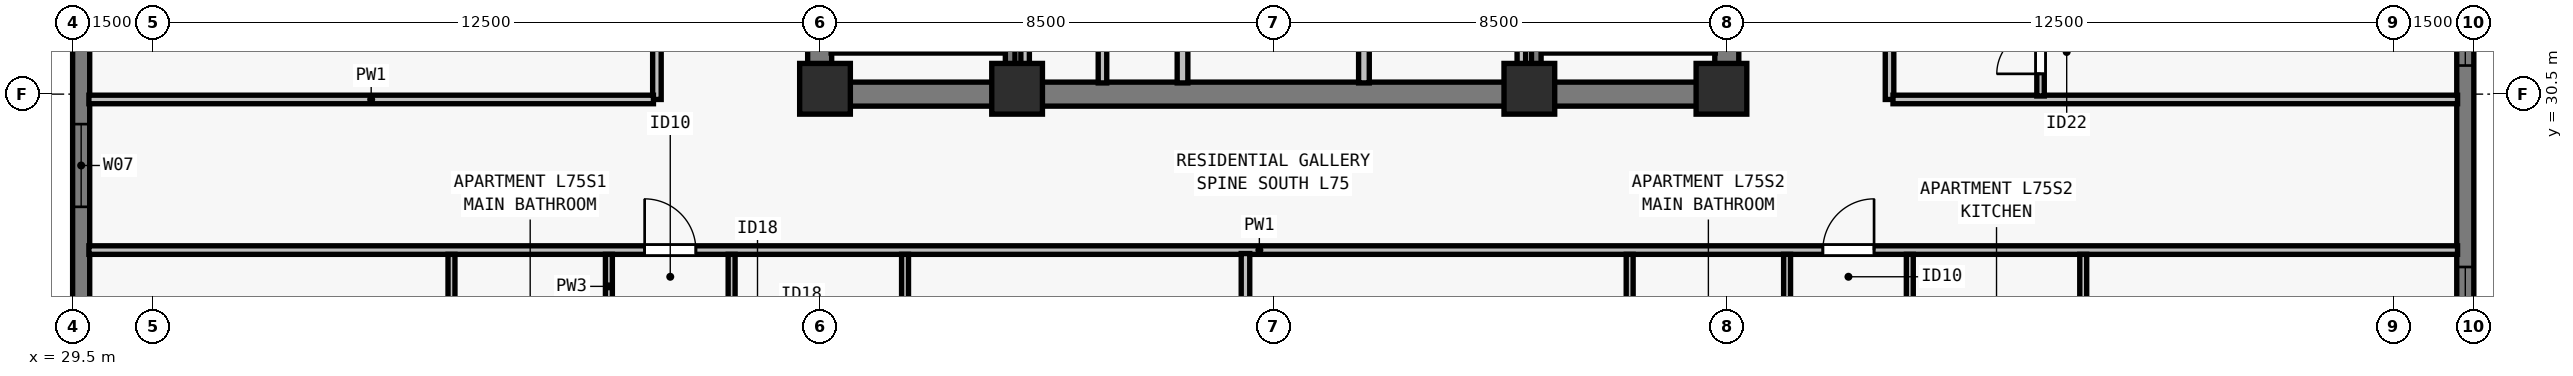
"""IFC4 building model, lengths in metres.
Left out: names, types, materials, properties, quantities, classifications, styles, units other than length and angle.
Written with IfcOpenShell. Run it as: python <this file> out.ifc"""

import sys

from ifc_helpers import new_model, si_unit, direction, frame, frame_2d, origin, origin_2d, place, context, subcontext, project, spatial, rectangle, extrude, element, fill, save


model = new_model("IFC4")
c1 = context("Model", 3, precision=1e-05, world=origin(), true_north=direction((0.0, 1.0)))
c2 = subcontext(c1, "Body", "Model", "MODEL_VIEW")
j1 = project(units=[si_unit("LENGTHUNIT", "METRE"), si_unit("PLANEANGLEUNIT", "RADIAN")], contexts=[c1])
p1 = place(None, origin())
s1 = spatial("IfcSite", under=j1, at=p1, CompositionType="ELEMENT")
p2 = place(p1, origin())
s2 = spatial("IfcBuilding", under=s1, at=p2, CompositionType="ELEMENT")
p3 = place(p2, frame((0.0, 0.0, 272.5)))
s3 = spatial("IfcBuildingStorey", under=s2, at=p3, CompositionType="ELEMENT", Elevation=272.5)
for number, where, z_axis, x_axis in (
    (1, (43.6, 30.6, 0.0), (0.0, 0.0, 1.0), (1.0, 0.0, 0.0)),
    (2, (47.2, 30.6, 0.0), (0.0, 0.0, 1.0), (1.0, 0.0, 0.0)),
    (3, (56.8, 30.6, 0.0), (0.0, 0.0, 1.0), (1.0, 0.0, 0.0)),
    (4, (60.4, 30.6, 0.0), (0.0, 0.0, 1.0), (1.0, 0.0, 0.0)),
):
    element("IfcColumn", number, at=place(p3, frame(where, z_axis=z_axis, x_axis=x_axis)), inside=s3, PredefinedType="COLUMN", context=c2, shape_type="SweptSolid", body=[
        extrude(rectangle(XDim=0.95, YDim=0.95, at=origin_2d()), origin(), (0.0, 0.0, 1.0), 3.5),
    ])
p4 = place(p3, frame((29.66, 21.5, 0.0), z_axis=(0.0, 0.0, 1.0), x_axis=(0.0, 1.0, 0.0)))
e5 = element("IfcWall", 5, at=p4, inside=s3, PredefinedType="SOLIDWALL", context=c2, shape_type="SweptSolid", body=[
    extrude(rectangle(XDim=34.702, YDim=0.32, at=frame_2d((17.351, 0.0))), origin(), (0.0, 0.0, 1.0), 3.24),
])
p5 = place(p4, frame((6.888, 0.0, 0.8)))
e6 = element("IfcOpeningElement", 6, at=p5, cuts=e5, PredefinedType="OPENING", context=c2, shape_type="SweptSolid", body=[
    extrude(rectangle(XDim=1.55, YDim=1.628, at=frame_2d((0.775, 0.814))), frame((0.0, 0.17, 0.0), z_axis=(0.0, -1.0, 0.0), x_axis=(1.0, 0.0, 0.0)), (0.0, 0.0, 1.0), 0.34),
])
p6 = place(p4, frame((10.113, 0.0, 0.8)))
e7 = element("IfcOpeningElement", 7, at=p6, cuts=e5, PredefinedType="OPENING", context=c2, shape_type="SweptSolid", body=[
    extrude(rectangle(XDim=1.85, YDim=1.628, at=frame_2d((0.925, 0.814))), frame((0.0, 0.17, 0.0), z_axis=(0.0, -1.0, 0.0), x_axis=(1.0, 0.0, 0.0)), (0.0, 0.0, 1.0), 0.34),
])
p7 = place(p4, frame((14.888, 0.0, 0.8)))
e8 = element("IfcOpeningElement", 8, at=p7, cuts=e5, PredefinedType="OPENING", context=c2, shape_type="SweptSolid", body=[
    extrude(rectangle(XDim=1.55, YDim=1.628, at=frame_2d((0.775, 0.814))), frame((0.0, 0.17, 0.0), z_axis=(0.0, -1.0, 0.0), x_axis=(1.0, 0.0, 0.0)), (0.0, 0.0, 1.0), 0.34),
])
p8 = place(p4, frame((18.114, 0.0, 0.8)))
e9 = element("IfcOpeningElement", 9, at=p8, cuts=e5, PredefinedType="OPENING", context=c2, shape_type="SweptSolid", body=[
    extrude(rectangle(XDim=1.85, YDim=1.628, at=frame_2d((0.925, 0.814))), frame((0.0, 0.17, 0.0), z_axis=(0.0, -1.0, 0.0), x_axis=(1.0, 0.0, 0.0)), (0.0, 0.0, 1.0), 0.34),
])
p9 = place(p4, frame((23.614, 0.0, 0.8)))
e10 = element("IfcOpeningElement", 10, at=p9, cuts=e5, PredefinedType="OPENING", context=c2, shape_type="SweptSolid", body=[
    extrude(rectangle(XDim=1.85, YDim=1.628, at=frame_2d((0.925, 0.814))), frame((0.0, 0.17, 0.0), z_axis=(0.0, -1.0, 0.0), x_axis=(1.0, 0.0, 0.0)), (0.0, 0.0, 1.0), 0.34),
])
p10 = place(p4, frame((29.24, 0.0, 0.8)))
e11 = element("IfcOpeningElement", 11, at=p10, cuts=e5, PredefinedType="OPENING", context=c2, shape_type="SweptSolid", body=[
    extrude(rectangle(XDim=1.55, YDim=1.628, at=frame_2d((0.775, 0.814))), frame((0.0, 0.17, 0.0), z_axis=(0.0, -1.0, 0.0), x_axis=(1.0, 0.0, 0.0)), (0.0, 0.0, 1.0), 0.34),
])
p11 = place(p3, frame((74.34, 56.5, 0.0), z_axis=(0.0, 0.0, 1.0), x_axis=(0.0, -1.0, 0.0)))
e12 = element("IfcWall", 12, at=p11, inside=s3, PredefinedType="SOLIDWALL", context=c2, shape_type="SweptSolid", body=[
    extrude(rectangle(XDim=34.702, YDim=0.32, at=frame_2d((17.351, 0.0))), origin(), (0.0, 0.0, 1.0), 3.24),
])
p12 = place(p11, frame((6.888, 0.0, 0.8)))
e13 = element("IfcOpeningElement", 13, at=p12, cuts=e12, PredefinedType="OPENING", context=c2, shape_type="SweptSolid", body=[
    extrude(rectangle(XDim=1.55, YDim=1.628, at=frame_2d((0.775, 0.814))), frame((0.0, 0.17, 0.0), z_axis=(0.0, -1.0, 0.0), x_axis=(1.0, 0.0, 0.0)), (0.0, 0.0, 1.0), 0.34),
])
p13 = place(p11, frame((10.113, 0.0, 0.8)))
e14 = element("IfcOpeningElement", 14, at=p13, cuts=e12, PredefinedType="OPENING", context=c2, shape_type="SweptSolid", body=[
    extrude(rectangle(XDim=1.85, YDim=1.628, at=frame_2d((0.925, 0.814))), frame((0.0, 0.17, 0.0), z_axis=(0.0, -1.0, 0.0), x_axis=(1.0, 0.0, 0.0)), (0.0, 0.0, 1.0), 0.34),
])
p14 = place(p11, frame((14.038, 0.0, 0.8)))
e15 = element("IfcOpeningElement", 15, at=p14, cuts=e12, PredefinedType="OPENING", context=c2, shape_type="SweptSolid", body=[
    extrude(rectangle(XDim=1.55, YDim=1.628, at=frame_2d((0.775, 0.814))), frame((0.0, 0.17, 0.0), z_axis=(0.0, -1.0, 0.0), x_axis=(1.0, 0.0, 0.0)), (0.0, 0.0, 1.0), 0.34),
])
p15 = place(p11, frame((18.114, 0.0, 0.8)))
e16 = element("IfcOpeningElement", 16, at=p15, cuts=e12, PredefinedType="OPENING", context=c2, shape_type="SweptSolid", body=[
    extrude(rectangle(XDim=1.85, YDim=1.628, at=frame_2d((0.925, 0.814))), frame((0.0, 0.17, 0.0), z_axis=(0.0, -1.0, 0.0), x_axis=(1.0, 0.0, 0.0)), (0.0, 0.0, 1.0), 0.34),
])
p16 = place(p11, frame((23.614, 0.0, 0.8)))
e17 = element("IfcOpeningElement", 17, at=p16, cuts=e12, PredefinedType="OPENING", context=c2, shape_type="SweptSolid", body=[
    extrude(rectangle(XDim=1.85, YDim=1.628, at=frame_2d((0.925, 0.814))), frame((0.0, 0.17, 0.0), z_axis=(0.0, -1.0, 0.0), x_axis=(1.0, 0.0, 0.0)), (0.0, 0.0, 1.0), 0.34),
])
p17 = place(p11, frame((29.24, 0.0, 0.8)))
e18 = element("IfcOpeningElement", 18, at=p17, cuts=e12, PredefinedType="OPENING", context=c2, shape_type="SweptSolid", body=[
    extrude(rectangle(XDim=1.55, YDim=1.628, at=frame_2d((0.775, 0.814))), frame((0.0, 0.17, 0.0), z_axis=(0.0, -1.0, 0.0), x_axis=(1.0, 0.0, 0.0)), (0.0, 0.0, 1.0), 0.34),
])
p18 = place(p3, frame((43.275, 30.5, 0.0), z_axis=(0.0, 0.0, 1.0), x_axis=(1.0, 0.0, 0.0)))
e19 = element("IfcWall", 19, at=p18, inside=s3, PredefinedType="SHEAR", context=c2, shape_type="SweptSolid", body=[
    extrude(rectangle(XDim=17.45, YDim=0.45, at=frame_2d((8.725, 0.0))), origin(), (0.0, 0.0, 1.0), 3.24),
])
for number, where, z_axis, x_axis in (
    (20, (43.5, 30.715, 0.0), (0.0, 0.0, 1.0), (0.0, 1.0, 0.0)),
    (21, (60.5, 30.715, 0.0), (0.0, 0.0, 1.0), (0.0, 1.0, 0.0)),
):
    element("IfcWall", number, at=place(p3, frame(where, z_axis=z_axis, x_axis=x_axis)), inside=s3, PredefinedType="SHEAR", context=c2, shape_type="SweptSolid", body=[
        extrude(rectangle(XDim=8.035, YDim=0.45, at=frame_2d((4.018, 0.0))), origin(), (0.0, 0.0, 1.0), 3.24),
    ])
p19 = place(p3, frame((50.3, 30.71, 0.0), z_axis=(0.0, 0.0, 1.0), x_axis=(0.0, 1.0, 0.0)))
e22 = element("IfcWall", 22, at=p19, inside=s3, PredefinedType="SOLIDWALL", context=c2, shape_type="SweptSolid", body=[
    extrude(rectangle(XDim=7.905, YDim=0.2, at=frame_2d((3.953, 0.0))), origin(), (0.0, 0.0, 1.0), 3.24),
])
p20 = place(p19, frame((2.14, 0.0, 0.0)))
e23 = element("IfcOpeningElement", 23, at=p20, cuts=e22, PredefinedType="OPENING", context=c2, shape_type="SweptSolid", body=[
    extrude(rectangle(XDim=0.95, YDim=2.12, at=frame_2d((0.475, 1.06))), frame((0.0, 0.11, 0.0), z_axis=(0.0, -1.0, 0.0), x_axis=(1.0, 0.0, 0.0)), (0.0, 0.0, 1.0), 0.22),
])
p21 = place(p3, frame((53.7, 30.71, 0.0), z_axis=(0.0, 0.0, 1.0), x_axis=(0.0, 1.0, 0.0)))
e24 = element("IfcWall", 24, at=p21, inside=s3, PredefinedType="SOLIDWALL", context=c2, shape_type="SweptSolid", body=[
    extrude(rectangle(XDim=7.905, YDim=0.2, at=frame_2d((3.953, 0.0))), origin(), (0.0, 0.0, 1.0), 3.24),
])
p22 = place(p21, frame((1.39, 0.0, 0.0)))
e25 = element("IfcOpeningElement", 25, at=p22, cuts=e24, PredefinedType="OPENING", context=c2, shape_type="SweptSolid", body=[
    extrude(rectangle(XDim=0.95, YDim=2.12, at=frame_2d((0.475, 1.06))), frame((0.0, 0.11, 0.0), z_axis=(0.0, -1.0, 0.0), x_axis=(1.0, 0.0, 0.0)), (0.0, 0.0, 1.0), 0.22),
])
p23 = place(p21, frame((5.39, 0.0, 0.0)))
e26 = element("IfcOpeningElement", 26, at=p23, cuts=e24, PredefinedType="OPENING", context=c2, shape_type="SweptSolid", body=[
    extrude(rectangle(XDim=0.85, YDim=2.12, at=frame_2d((0.425, 1.06))), frame((0.0, 0.11, 0.0), z_axis=(0.0, -1.0, 0.0), x_axis=(1.0, 0.0, 0.0)), (0.0, 0.0, 1.0), 0.22),
])
p24 = place(p3, frame((47.35, 30.71, 0.0), z_axis=(0.0, 0.0, 1.0), x_axis=(0.0, 1.0, 0.0)))
e27 = element("IfcWall", 27, at=p24, inside=s3, PredefinedType="PARTITIONING", context=c2, shape_type="SweptSolid", body=[
    extrude(rectangle(XDim=7.905, YDim=0.16, at=frame_2d((3.953, 0.0))), origin(), (0.0, 0.0, 1.0), 3.24),
])
p25 = place(p3, frame((48.8, 30.71, 0.0), z_axis=(0.0, 0.0, 1.0), x_axis=(0.0, 1.0, 0.0)))
e28 = element("IfcWall", 28, at=p25, inside=s3, PredefinedType="PARTITIONING", context=c2, shape_type="SweptSolid", body=[
    extrude(rectangle(XDim=7.905, YDim=0.16, at=frame_2d((3.953, 0.0))), origin(), (0.0, 0.0, 1.0), 3.24),
])
p26 = place(p25, frame((3.54, 0.0, 0.0)))
e29 = element("IfcOpeningElement", 29, at=p26, cuts=e28, PredefinedType="OPENING", context=c2, shape_type="SweptSolid", body=[
    extrude(rectangle(XDim=0.85, YDim=2.12, at=frame_2d((0.425, 1.06))), frame((0.0, 0.09, 0.0), z_axis=(0.0, -1.0, 0.0), x_axis=(1.0, 0.0, 0.0)), (0.0, 0.0, 1.0), 0.18),
])
p27 = place(p3, frame((56.65, 30.71, 0.0), z_axis=(0.0, 0.0, 1.0), x_axis=(0.0, 1.0, 0.0)))
e30 = element("IfcWall", 30, at=p27, inside=s3, PredefinedType="PARTITIONING", context=c2, shape_type="SweptSolid", body=[
    extrude(rectangle(XDim=7.905, YDim=0.16, at=frame_2d((3.953, 0.0))), origin(), (0.0, 0.0, 1.0), 3.24),
])
p28 = place(p3, frame((29.805, 27.577, 0.0), z_axis=(0.0, 0.0, 1.0), x_axis=(1.0, 0.0, 0.0)))
e31 = element("IfcWall", 31, at=p28, inside=s3, PredefinedType="PARTITIONING", context=c2, shape_type="SweptSolid", body=[
    extrude(rectangle(XDim=44.39, YDim=0.16, at=frame_2d((22.195, 0.0))), origin(), (0.0, 0.0, 1.0), 2.908),
])
p29 = place(p28, frame((10.415, 0.0, 0.0)))
e32 = element("IfcOpeningElement", 32, at=p29, cuts=e31, PredefinedType="OPENING", context=c2, shape_type="SweptSolid", body=[
    extrude(rectangle(XDim=0.96, YDim=2.18, at=frame_2d((0.48, 1.09))), frame((0.0, 0.09, 0.0), z_axis=(0.0, -1.0, 0.0), x_axis=(1.0, 0.0, 0.0)), (0.0, 0.0, 1.0), 0.18),
])
p30 = place(p28, frame((32.495, 0.0, 0.0)))
e33 = element("IfcOpeningElement", 33, at=p30, cuts=e31, PredefinedType="OPENING", context=c2, shape_type="SweptSolid", body=[
    extrude(rectangle(XDim=0.96, YDim=2.18, at=frame_2d((0.48, 1.09))), frame((0.0, 0.09, 0.0), z_axis=(0.0, -1.0, 0.0), x_axis=(1.0, 0.0, 0.0)), (0.0, 0.0, 1.0), 0.18),
])
p31 = place(p3, frame((40.45, 30.4, 0.0), z_axis=(0.0, 0.0, 1.0), x_axis=(0.0, 1.0, 0.0)))
e34 = element("IfcWall", 34, at=p31, inside=s3, PredefinedType="PARTITIONING", context=c2, shape_type="SweptSolid", body=[
    extrude(rectangle(XDim=17.2, YDim=0.16, at=frame_2d((8.6, 0.0))), origin(), (0.0, 0.0, 1.0), 3.24),
])
p32 = place(p31, frame((3.6, 0.0, 0.0)))
e35 = element("IfcOpeningElement", 35, at=p32, cuts=e34, PredefinedType="OPENING", context=c2, shape_type="SweptSolid", body=[
    extrude(rectangle(XDim=0.96, YDim=2.12, at=frame_2d((0.48, 1.06))), frame((0.0, 0.09, 0.0), z_axis=(0.0, -1.0, 0.0), x_axis=(1.0, 0.0, 0.0)), (0.0, 0.0, 1.0), 0.18),
])
p33 = place(p31, frame((12.44, 0.0, 0.0)))
e36 = element("IfcOpeningElement", 36, at=p33, cuts=e34, PredefinedType="OPENING", context=c2, shape_type="SweptSolid", body=[
    extrude(rectangle(XDim=0.96, YDim=2.18, at=frame_2d((0.48, 1.09))), frame((0.0, 0.09, 0.0), z_axis=(0.0, -1.0, 0.0), x_axis=(1.0, 0.0, 0.0)), (0.0, 0.0, 1.0), 0.18),
])
p34 = place(p3, frame((63.55, 30.4, 0.0), z_axis=(0.0, 0.0, 1.0), x_axis=(0.0, 1.0, 0.0)))
e37 = element("IfcWall", 37, at=p34, inside=s3, PredefinedType="PARTITIONING", context=c2, shape_type="SweptSolid", body=[
    extrude(rectangle(XDim=17.2, YDim=0.16, at=frame_2d((8.6, 0.0))), origin(), (0.0, 0.0, 1.0), 3.24),
])
p35 = place(p34, frame((8.12, 0.0, 0.0)))
e38 = element("IfcOpeningElement", 38, at=p35, cuts=e37, PredefinedType="OPENING", context=c2, shape_type="SweptSolid", body=[
    extrude(rectangle(XDim=0.96, YDim=2.18, at=frame_2d((0.48, 1.09))), frame((0.0, 0.09, 0.0), z_axis=(0.0, -1.0, 0.0), x_axis=(1.0, 0.0, 0.0)), (0.0, 0.0, 1.0), 0.18),
])
for number, where, z_axis, x_axis in (
    (39, (29.805, 30.4, 0.0), (0.0, 0.0, 1.0), (1.0, 0.0, 0.0)),
    (40, (63.615, 30.4, 0.0), (0.0, 0.0, 1.0), (1.0, 0.0, 0.0)),
):
    element("IfcWall", number, at=place(p3, frame(where, z_axis=z_axis, x_axis=x_axis)), inside=s3, PredefinedType="PARTITIONING", context=c2, shape_type="SweptSolid", body=[
        extrude(rectangle(XDim=10.58, YDim=0.16, at=frame_2d((5.29, 0.0))), origin(), (0.0, 0.0, 1.0), 3.24),
    ])
p36 = place(p3, frame((36.6, 24.748, 0.0), z_axis=(0.0, 0.0, 1.0), x_axis=(0.0, 1.0, 0.0)))
e41 = element("IfcWall", 41, at=p36, inside=s3, PredefinedType="PLUMBINGWALL", context=c2, shape_type="SweptSolid", body=[
    extrude(rectangle(XDim=2.75, YDim=0.13, at=frame_2d((1.375, 0.0))), origin(), (0.0, 0.0, 1.0), 3.24),
])
p37 = place(p3, frame((39.55, 24.748, 0.0), z_axis=(0.0, 0.0, 1.0), x_axis=(0.0, 1.0, 0.0)))
e42 = element("IfcWall", 42, at=p37, inside=s3, PredefinedType="PLUMBINGWALL", context=c2, shape_type="SweptSolid", body=[
    extrude(rectangle(XDim=2.75, YDim=0.13, at=frame_2d((1.375, 0.0))), origin(), (0.0, 0.0, 1.0), 3.24),
])
p38 = place(p37, frame((0.55, 0.0, 0.0)))
e43 = element("IfcOpeningElement", 43, at=p38, cuts=e42, PredefinedType="OPENING", context=c2, shape_type="SweptSolid", body=[
    extrude(rectangle(XDim=0.85, YDim=2.08, at=frame_2d((0.425, 1.04))), frame((0.0, 0.075, 0.0), z_axis=(0.0, -1.0, 0.0), x_axis=(1.0, 0.0, 0.0)), (0.0, 0.0, 1.0), 0.15),
])
p39 = place(p3, frame((45.1, 24.748, 0.0), z_axis=(0.0, 0.0, 1.0), x_axis=(0.0, 1.0, 0.0)))
e44 = element("IfcWall", 44, at=p39, inside=s3, PredefinedType="PLUMBINGWALL", context=c2, shape_type="SweptSolid", body=[
    extrude(rectangle(XDim=2.75, YDim=0.13, at=frame_2d((1.375, 0.0))), origin(), (0.0, 0.0, 1.0), 3.24),
])
p40 = place(p3, frame((41.85, 24.748, 0.0), z_axis=(0.0, 0.0, 1.0), x_axis=(0.0, 1.0, 0.0)))
e45 = element("IfcWall", 45, at=p40, inside=s3, PredefinedType="PLUMBINGWALL", context=c2, shape_type="SweptSolid", body=[
    extrude(rectangle(XDim=2.75, YDim=0.13, at=frame_2d((1.375, 0.0))), origin(), (0.0, 0.0, 1.0), 3.24),
])
p41 = place(p40, frame((0.55, 0.0, 0.0)))
e46 = element("IfcOpeningElement", 46, at=p41, cuts=e45, PredefinedType="OPENING", context=c2, shape_type="SweptSolid", body=[
    extrude(rectangle(XDim=0.88, YDim=2.1, at=frame_2d((0.44, 1.05))), frame((0.0, 0.075, 0.0), z_axis=(0.0, -1.0, 0.0), x_axis=(1.0, 0.0, 0.0)), (0.0, 0.0, 1.0), 0.15),
])
p42 = place(p3, frame((51.48, 16.77, 0.0), z_axis=(0.0, 0.0, 1.0), x_axis=(0.0, 1.0, 0.0)))
e47 = element("IfcWall", 47, at=p42, inside=s3, PredefinedType="PARTITIONING", context=c2, shape_type="SweptSolid", body=[
    extrude(rectangle(XDim=10.742, YDim=0.16, at=frame_2d((5.371, 0.0))), origin(), (0.0, 0.0, 1.0), 2.908),
])
p43 = place(p3, frame((58.68, 24.748, 0.0), z_axis=(0.0, 0.0, 1.0), x_axis=(0.0, 1.0, 0.0)))
e48 = element("IfcWall", 48, at=p43, inside=s3, PredefinedType="PLUMBINGWALL", context=c2, shape_type="SweptSolid", body=[
    extrude(rectangle(XDim=2.75, YDim=0.13, at=frame_2d((1.375, 0.0))), origin(), (0.0, 0.0, 1.0), 3.24),
])
p44 = place(p3, frame((61.63, 24.748, 0.0), z_axis=(0.0, 0.0, 1.0), x_axis=(0.0, 1.0, 0.0)))
e49 = element("IfcWall", 49, at=p44, inside=s3, PredefinedType="PLUMBINGWALL", context=c2, shape_type="SweptSolid", body=[
    extrude(rectangle(XDim=2.75, YDim=0.13, at=frame_2d((1.375, 0.0))), origin(), (0.0, 0.0, 1.0), 3.24),
])
p45 = place(p44, frame((0.55, 0.0, 0.0)))
e50 = element("IfcOpeningElement", 50, at=p45, cuts=e49, PredefinedType="OPENING", context=c2, shape_type="SweptSolid", body=[
    extrude(rectangle(XDim=0.85, YDim=2.08, at=frame_2d((0.425, 1.04))), frame((0.0, 0.075, 0.0), z_axis=(0.0, -1.0, 0.0), x_axis=(1.0, 0.0, 0.0)), (0.0, 0.0, 1.0), 0.15),
])
p46 = place(p3, frame((67.18, 24.748, 0.0), z_axis=(0.0, 0.0, 1.0), x_axis=(0.0, 1.0, 0.0)))
e51 = element("IfcWall", 51, at=p46, inside=s3, PredefinedType="PLUMBINGWALL", context=c2, shape_type="SweptSolid", body=[
    extrude(rectangle(XDim=2.75, YDim=0.13, at=frame_2d((1.375, 0.0))), origin(), (0.0, 0.0, 1.0), 3.24),
])
p47 = place(p3, frame((63.93, 24.748, 0.0), z_axis=(0.0, 0.0, 1.0), x_axis=(0.0, 1.0, 0.0)))
e52 = element("IfcWall", 52, at=p47, inside=s3, PredefinedType="PLUMBINGWALL", context=c2, shape_type="SweptSolid", body=[
    extrude(rectangle(XDim=2.75, YDim=0.13, at=frame_2d((1.375, 0.0))), origin(), (0.0, 0.0, 1.0), 2.523),
])
p48 = place(p47, frame((0.55, 0.0, 0.0)))
e53 = element("IfcOpeningElement", 53, at=p48, cuts=e52, PredefinedType="OPENING", context=c2, shape_type="SweptSolid", body=[
    extrude(rectangle(XDim=0.88, YDim=2.1, at=frame_2d((0.44, 1.05))), frame((0.0, 0.075, 0.0), z_axis=(0.0, -1.0, 0.0), x_axis=(1.0, 0.0, 0.0)), (0.0, 0.0, 1.0), 0.15),
])
p49 = place(p3, frame((66.38, 30.465, 0.0), z_axis=(0.0, 0.0, 1.0), x_axis=(0.0, 1.0, 0.0)))
e54 = element("IfcWall", 54, at=p49, inside=s3, PredefinedType="PARTITIONING", context=c2, shape_type="SweptSolid", body=[
    extrude(rectangle(XDim=4.16, YDim=0.14, at=frame_2d((2.08, 0.0))), origin(), (0.0, 0.0, 1.0), 3.24),
])
p50 = place(p49, frame((0.415, 0.0, 0.0)))
e55 = element("IfcOpeningElement", 55, at=p50, cuts=e54, PredefinedType="OPENING", context=c2, shape_type="SweptSolid", body=[
    extrude(rectangle(XDim=0.82, YDim=2.1, at=frame_2d((0.41, 1.05))), frame((0.0, 0.08, 0.0), z_axis=(0.0, -1.0, 0.0), x_axis=(1.0, 0.0, 0.0)), (0.0, 0.0, 1.0), 0.16),
])
p51 = place(p3, frame((43.715, 31.36, 0.0), z_axis=(0.0, 0.0, 1.0), x_axis=(1.0, 0.0, 0.0)))
e56 = element("IfcWall", 56, at=p51, inside=s3, PredefinedType="SOLIDWALL", context=c2, shape_type="SweptSolid", body=[
    extrude(rectangle(XDim=3.28, YDim=0.18, at=frame_2d((1.64, 0.0))), origin(), (0.0, 0.0, 1.0), 3.24),
])
p52 = place(p3, frame((47.07, 38.78, 0.0), z_axis=(0.0, 0.0, 1.0), x_axis=(0.0, -1.0, 0.0)))
e57 = element("IfcWall", 57, at=p52, inside=s3, PredefinedType="SOLIDWALL", context=c2, shape_type="SweptSolid", body=[
    extrude(rectangle(XDim=8.067, YDim=0.18, at=frame_2d((4.034, 0.0))), origin(), (0.0, 0.0, 1.0), 3.24),
])
p53 = place(p3, frame((57.005, 31.36, 0.0), z_axis=(0.0, 0.0, 1.0), x_axis=(1.0, 0.0, 0.0)))
e58 = element("IfcWall", 58, at=p53, inside=s3, PredefinedType="SOLIDWALL", context=c2, shape_type="SweptSolid", body=[
    extrude(rectangle(XDim=3.28, YDim=0.18, at=frame_2d((1.64, 0.0))), origin(), (0.0, 0.0, 1.0), 3.24),
])
p54 = place(p3, frame((56.93, 38.78, 0.0), z_axis=(0.0, 0.0, 1.0), x_axis=(0.0, -1.0, 0.0)))
e59 = element("IfcWall", 59, at=p54, inside=s3, PredefinedType="SOLIDWALL", context=c2, shape_type="SweptSolid", body=[
    extrude(rectangle(XDim=8.067, YDim=0.18, at=frame_2d((4.034, 0.0))), origin(), (0.0, 0.0, 1.0), 3.24),
])
p55 = place(p5, origin())
e60 = element("IfcWindow", 60, at=p55, inside=s3, PartitioningType="SINGLE_PANEL", PredefinedType="WINDOW", context=c2, shape_type="SweptSolid", body=[
    extrude(rectangle(XDim=1.55, YDim=1.628, at=frame_2d((0.775, 0.814))), frame((0.0, -0.05, 0.0), z_axis=(0.0, -1.0, 0.0), x_axis=(1.0, 0.0, 0.0)), (0.0, 0.0, 1.0), 0.06),
])
fill(e6, e60)
p56 = place(p16, origin())
e61 = element("IfcWindow", 61, at=p56, inside=s3, PartitioningType="SINGLE_PANEL", PredefinedType="WINDOW", context=c2, shape_type="SweptSolid", body=[
    extrude(rectangle(XDim=1.85, YDim=1.628, at=frame_2d((0.925, 0.814))), frame((0.0, -0.05, 0.0), z_axis=(0.0, -1.0, 0.0), x_axis=(1.0, 0.0, 0.0)), (0.0, 0.0, 1.0), 0.06),
])
fill(e17, e61)
p57 = place(p17, origin())
e62 = element("IfcWindow", 62, at=p57, inside=s3, PartitioningType="SINGLE_PANEL", PredefinedType="WINDOW", context=c2, shape_type="SweptSolid", body=[
    extrude(rectangle(XDim=1.55, YDim=1.628, at=frame_2d((0.775, 0.814))), frame((0.0, -0.05, 0.0), z_axis=(0.0, -1.0, 0.0), x_axis=(1.0, 0.0, 0.0)), (0.0, 0.0, 1.0), 0.06),
])
fill(e18, e62)
p58 = place(p29, origin())
e63 = element("IfcDoor", 63, at=p58, inside=s3, OperationType="SINGLE_SWING_LEFT", PredefinedType="DOOR", context=c2, shape_type="SweptSolid", body=[
    extrude(rectangle(XDim=0.96, YDim=2.18, at=frame_2d((0.48, 1.09))), frame((0.0, 0.025, 0.0), z_axis=(0.0, -1.0, 0.0), x_axis=(1.0, 0.0, 0.0)), (0.0, 0.0, 1.0), 0.05),
])
fill(e32, e63)
p59 = place(p30, origin())
e64 = element("IfcDoor", 64, at=p59, inside=s3, OperationType="SINGLE_SWING_RIGHT", PredefinedType="DOOR", context=c2, shape_type="SweptSolid", body=[
    extrude(rectangle(XDim=0.96, YDim=2.18, at=frame_2d((0.48, 1.09))), frame((0.0, 0.025, 0.0), z_axis=(0.0, -1.0, 0.0), x_axis=(1.0, 0.0, 0.0)), (0.0, 0.0, 1.0), 0.05),
])
fill(e33, e64)
p60 = place(p50, origin())
e65 = element("IfcDoor", 65, at=p60, inside=s3, OperationType="SINGLE_SWING_LEFT", PredefinedType="DOOR", context=c2, shape_type="SweptSolid", body=[
    extrude(rectangle(XDim=0.82, YDim=2.1, at=frame_2d((0.41, 1.05))), frame((0.0, 0.025, 0.0), z_axis=(0.0, -1.0, 0.0), x_axis=(1.0, 0.0, 0.0)), (0.0, 0.0, 1.0), 0.05),
])
fill(e55, e65)
save(model, sys.argv[1])
